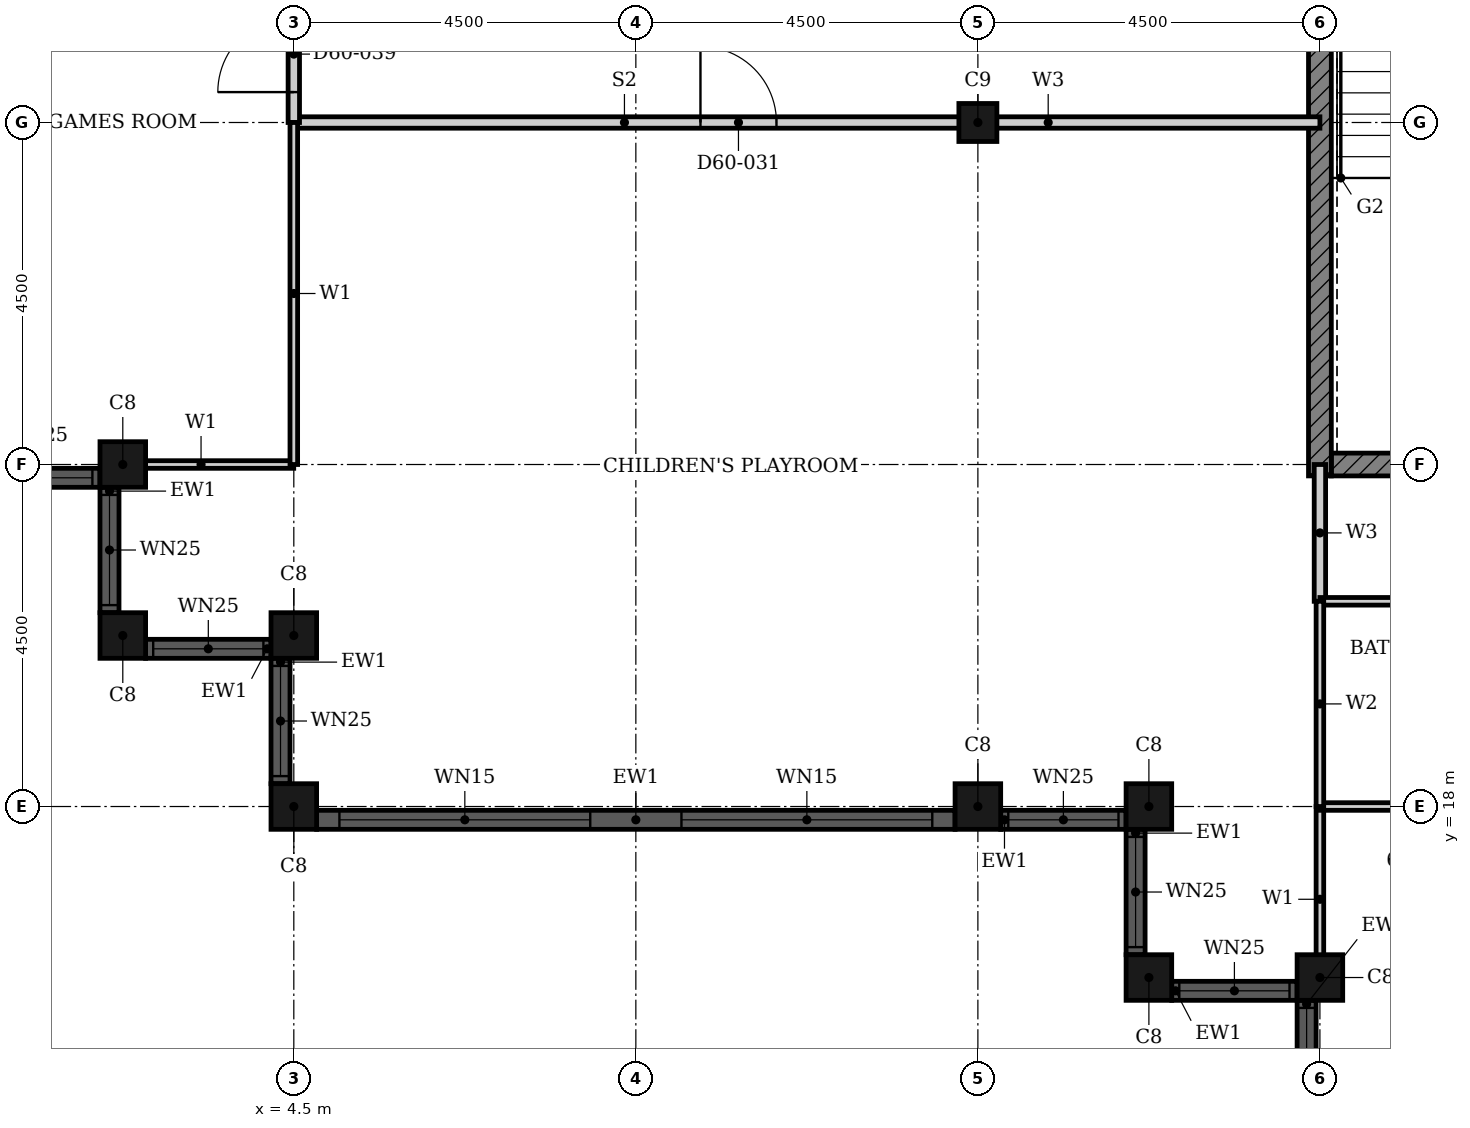
"""IFC4 building model, lengths in metres.
Left out: names, types, materials, properties, quantities, classifications, styles, units other than length and angle.
Written with IfcOpenShell. Run it as: python <this file> out.ifc"""

import sys

from ifc_helpers import new_model, si_unit, direction, frame, frame_2d, origin, origin_2d, place, context, subcontext, project, spatial, rectangle, hollow_rectangle, extrude, element, fill, save


model = new_model("IFC4")
c1 = context("Model", 3, precision=1e-05, world=origin(), true_north=direction((0.0, 1.0)))
c2 = subcontext(c1, "Body", "Model", "MODEL_VIEW")
j1 = project(units=[si_unit("LENGTHUNIT", "METRE"), si_unit("PLANEANGLEUNIT", "RADIAN")], contexts=[c1])
p1 = place(None, origin())
s1 = spatial("IfcSite", under=j1, at=p1, CompositionType="ELEMENT")
p2 = place(p1, origin())
s2 = spatial("IfcBuilding", under=s1, at=p2, CompositionType="ELEMENT")
p3 = place(p2, frame((0.0, 0.0, 237.9)))
s3 = spatial("IfcBuildingStorey", under=s2, at=p3, CompositionType="ELEMENT", Elevation=237.9)
for number, where, z_axis, x_axis in (
    (1, (15.75, 18.0, 0.0), (0.0, 0.0, 1.0), (1.0, 0.0, 0.0)),
    (2, (15.75, 15.75, 0.0), (0.0, 0.0, 1.0), (1.0, 0.0, 0.0)),
    (3, (18.0, 15.75, 0.0), (0.0, 0.0, 1.0), (1.0, 0.0, 0.0)),
    (4, (2.25, 22.5, 0.0), (0.0, 0.0, 1.0), (1.0, 0.0, 0.0)),
    (5, (2.25, 20.25, 0.0), (0.0, 0.0, 1.0), (1.0, 0.0, 0.0)),
    (6, (4.5, 20.25, 0.0), (0.0, 0.0, 1.0), (1.0, 0.0, 0.0)),
    (7, (4.5, 18.0, 0.0), (0.0, 0.0, 1.0), (1.0, 0.0, 0.0)),
    (8, (13.5, 18.0, 0.0), (0.0, 0.0, 1.0), (1.0, 0.0, 0.0)),
):
    element("IfcColumn", number, at=place(p3, frame(where, z_axis=z_axis, x_axis=x_axis)), inside=s3, PredefinedType="COLUMN", context=c2, shape_type="SweptSolid", body=[
        extrude(hollow_rectangle(XDim=0.6, YDim=0.6, WallThickness=0.02, at=origin_2d()), origin(), (0.0, 0.0, 1.0), 3.7),
    ])
p4 = place(p3, frame((13.5, 27.0, 0.0), z_axis=(0.0, 0.0, 1.0), x_axis=(1.0, 0.0, 0.0)))
e9 = element("IfcColumn", 9, at=p4, inside=s3, PredefinedType="COLUMN", context=c2, shape_type="SweptSolid", body=[
    extrude(hollow_rectangle(XDim=0.5, YDim=0.5, WallThickness=0.016, InnerFilletRadius=0.032, OuterFilletRadius=0.048, at=origin_2d()), origin(), (0.0, 0.0, 1.0), 3.7),
])
p5 = place(p3, frame((15.575, 17.7, 0.0), z_axis=(0.0, 0.0, 1.0), x_axis=(0.0, -1.0, 0.0)))
e10 = element("IfcWall", 10, at=p5, inside=s3, PredefinedType="SOLIDWALL", context=c2, shape_type="SweptSolid", body=[
    extrude(rectangle(XDim=1.65, YDim=0.25, at=frame_2d((0.825, 0.0))), origin(), (0.0, 0.0, 1.0), 3.7),
])
p6 = place(p5, frame((0.1, 0.0, 0.9)))
e11 = element("IfcOpeningElement", 11, at=p6, cuts=e10, PredefinedType="OPENING", context=c2, shape_type="SweptSolid", body=[
    extrude(rectangle(XDim=1.45, YDim=1.85, at=frame_2d((0.725, 0.925))), frame((0.0, 0.135, 0.0), z_axis=(0.0, -1.0, 0.0), x_axis=(1.0, 0.0, 0.0)), (0.0, 0.0, 1.0), 0.27),
])
p7 = place(p3, frame((16.05, 15.575, 0.0), z_axis=(0.0, 0.0, 1.0), x_axis=(1.0, 0.0, 0.0)))
e12 = element("IfcWall", 12, at=p7, inside=s3, PredefinedType="SOLIDWALL", context=c2, shape_type="SweptSolid", body=[
    extrude(rectangle(XDim=1.65, YDim=0.25, at=frame_2d((0.825, 0.0))), origin(), (0.0, 0.0, 1.0), 3.7),
])
p8 = place(p7, frame((0.1, 0.0, 0.9)))
e13 = element("IfcOpeningElement", 13, at=p8, cuts=e12, PredefinedType="OPENING", context=c2, shape_type="SweptSolid", body=[
    extrude(rectangle(XDim=1.45, YDim=1.85, at=frame_2d((0.725, 0.925))), frame((0.0, 0.135, 0.0), z_axis=(0.0, -1.0, 0.0), x_axis=(1.0, 0.0, 0.0)), (0.0, 0.0, 1.0), 0.27),
])
p9 = place(p3, frame((17.825, 15.45, 0.0), z_axis=(0.0, 0.0, 1.0), x_axis=(0.0, -1.0, 0.0)))
e14 = element("IfcWall", 14, at=p9, inside=s3, PredefinedType="SOLIDWALL", context=c2, shape_type="SweptSolid", body=[
    extrude(rectangle(XDim=1.65, YDim=0.25, at=frame_2d((0.825, 0.0))), origin(), (0.0, 0.0, 1.0), 3.7),
])
p10 = place(p9, frame((0.1, 0.0, 0.9)))
e15 = element("IfcOpeningElement", 15, at=p10, cuts=e14, PredefinedType="OPENING", context=c2, shape_type="SweptSolid", body=[
    extrude(rectangle(XDim=1.45, YDim=1.85, at=frame_2d((0.725, 0.925))), frame((0.0, 0.135, 0.0), z_axis=(0.0, -1.0, 0.0), x_axis=(1.0, 0.0, 0.0)), (0.0, 0.0, 1.0), 0.27),
])
p11 = place(p3, frame((0.3, 22.325, 0.0), z_axis=(0.0, 0.0, 1.0), x_axis=(1.0, 0.0, 0.0)))
e16 = element("IfcWall", 16, at=p11, inside=s3, PredefinedType="SOLIDWALL", context=c2, shape_type="SweptSolid", body=[
    extrude(rectangle(XDim=1.65, YDim=0.25, at=frame_2d((0.825, 0.0))), origin(), (0.0, 0.0, 1.0), 3.7),
])
p12 = place(p11, frame((0.1, 0.0, 0.9)))
e17 = element("IfcOpeningElement", 17, at=p12, cuts=e16, PredefinedType="OPENING", context=c2, shape_type="SweptSolid", body=[
    extrude(rectangle(XDim=1.45, YDim=1.85, at=frame_2d((0.725, 0.925))), frame((0.0, 0.135, 0.0), z_axis=(0.0, -1.0, 0.0), x_axis=(1.0, 0.0, 0.0)), (0.0, 0.0, 1.0), 0.27),
])
p13 = place(p3, frame((2.075, 22.2, 0.0), z_axis=(0.0, 0.0, 1.0), x_axis=(0.0, -1.0, 0.0)))
e18 = element("IfcWall", 18, at=p13, inside=s3, PredefinedType="SOLIDWALL", context=c2, shape_type="SweptSolid", body=[
    extrude(rectangle(XDim=1.65, YDim=0.25, at=frame_2d((0.825, 0.0))), origin(), (0.0, 0.0, 1.0), 3.7),
])
p14 = place(p13, frame((0.1, 0.0, 0.9)))
e19 = element("IfcOpeningElement", 19, at=p14, cuts=e18, PredefinedType="OPENING", context=c2, shape_type="SweptSolid", body=[
    extrude(rectangle(XDim=1.45, YDim=1.85, at=frame_2d((0.725, 0.925))), frame((0.0, 0.135, 0.0), z_axis=(0.0, -1.0, 0.0), x_axis=(1.0, 0.0, 0.0)), (0.0, 0.0, 1.0), 0.27),
])
p15 = place(p3, frame((2.55, 20.075, 0.0), z_axis=(0.0, 0.0, 1.0), x_axis=(1.0, 0.0, 0.0)))
e20 = element("IfcWall", 20, at=p15, inside=s3, PredefinedType="SOLIDWALL", context=c2, shape_type="SweptSolid", body=[
    extrude(rectangle(XDim=1.65, YDim=0.25, at=frame_2d((0.825, 0.0))), origin(), (0.0, 0.0, 1.0), 3.7),
])
p16 = place(p15, frame((0.1, 0.0, 0.9)))
e21 = element("IfcOpeningElement", 21, at=p16, cuts=e20, PredefinedType="OPENING", context=c2, shape_type="SweptSolid", body=[
    extrude(rectangle(XDim=1.45, YDim=1.85, at=frame_2d((0.725, 0.925))), frame((0.0, 0.135, 0.0), z_axis=(0.0, -1.0, 0.0), x_axis=(1.0, 0.0, 0.0)), (0.0, 0.0, 1.0), 0.27),
])
p17 = place(p3, frame((4.325, 19.95, 0.0), z_axis=(0.0, 0.0, 1.0), x_axis=(0.0, -1.0, 0.0)))
e22 = element("IfcWall", 22, at=p17, inside=s3, PredefinedType="SOLIDWALL", context=c2, shape_type="SweptSolid", body=[
    extrude(rectangle(XDim=1.65, YDim=0.25, at=frame_2d((0.825, 0.0))), origin(), (0.0, 0.0, 1.0), 3.7),
])
p18 = place(p17, frame((0.1, 0.0, 0.9)))
e23 = element("IfcOpeningElement", 23, at=p18, cuts=e22, PredefinedType="OPENING", context=c2, shape_type="SweptSolid", body=[
    extrude(rectangle(XDim=1.45, YDim=1.85, at=frame_2d((0.725, 0.925))), frame((0.0, 0.135, 0.0), z_axis=(0.0, -1.0, 0.0), x_axis=(1.0, 0.0, 0.0)), (0.0, 0.0, 1.0), 0.27),
])
p19 = place(p3, frame((4.8, 17.825, 0.0), z_axis=(0.0, 0.0, 1.0), x_axis=(1.0, 0.0, 0.0)))
e24 = element("IfcWall", 24, at=p19, inside=s3, PredefinedType="SOLIDWALL", context=c2, shape_type="SweptSolid", body=[
    extrude(rectangle(XDim=8.4, YDim=0.25, at=frame_2d((4.2, 0.0))), origin(), (0.0, 0.0, 1.0), 3.7),
])
p20 = place(p19, frame((0.3, 0.0, 0.45)))
e25 = element("IfcOpeningElement", 25, at=p20, cuts=e24, PredefinedType="OPENING", context=c2, shape_type="SweptSolid", body=[
    extrude(rectangle(XDim=3.3, YDim=2.3, at=frame_2d((1.65, 1.15))), frame((0.0, 0.135, 0.0), z_axis=(0.0, -1.0, 0.0), x_axis=(1.0, 0.0, 0.0)), (0.0, 0.0, 1.0), 0.27),
])
p21 = place(p19, frame((4.8, 0.0, 0.45)))
e26 = element("IfcOpeningElement", 26, at=p21, cuts=e24, PredefinedType="OPENING", context=c2, shape_type="SweptSolid", body=[
    extrude(rectangle(XDim=3.3, YDim=2.3, at=frame_2d((1.65, 1.15))), frame((0.0, 0.135, 0.0), z_axis=(0.0, -1.0, 0.0), x_axis=(1.0, 0.0, 0.0)), (0.0, 0.0, 1.0), 0.27),
])
p22 = place(p3, frame((13.8, 17.825, 0.0), z_axis=(0.0, 0.0, 1.0), x_axis=(1.0, 0.0, 0.0)))
e27 = element("IfcWall", 27, at=p22, inside=s3, PredefinedType="SOLIDWALL", context=c2, shape_type="SweptSolid", body=[
    extrude(rectangle(XDim=1.65, YDim=0.25, at=frame_2d((0.825, 0.0))), origin(), (0.0, 0.0, 1.0), 3.7),
])
p23 = place(p22, frame((0.1, 0.0, 0.9)))
e28 = element("IfcOpeningElement", 28, at=p23, cuts=e27, PredefinedType="OPENING", context=c2, shape_type="SweptSolid", body=[
    extrude(rectangle(XDim=1.45, YDim=1.85, at=frame_2d((0.725, 0.925))), frame((0.0, 0.135, 0.0), z_axis=(0.0, -1.0, 0.0), x_axis=(1.0, 0.0, 0.0)), (0.0, 0.0, 1.0), 0.27),
])
p24 = place(p3, frame((18.15, 22.5, 0.0), z_axis=(0.0, 0.0, 1.0), x_axis=(1.0, 0.0, 0.0)))
e29 = element("IfcWall", 29, at=p24, inside=s3, PredefinedType="SHEAR", context=c2, shape_type="SweptSolid", body=[
    extrude(rectangle(XDim=4.225, YDim=0.3, at=frame_2d((2.113, 0.0))), origin(), (0.0, 0.0, 1.0), 3.4),
])
p25 = place(p3, frame((18.0, 22.35, 0.0), z_axis=(0.0, 0.0, 1.0), x_axis=(0.0, 1.0, 0.0)))
e30 = element("IfcWall", 30, at=p25, inside=s3, PredefinedType="SHEAR", context=c2, shape_type="SweptSolid", body=[
    extrude(rectangle(XDim=9.3, YDim=0.3, at=frame_2d((4.65, 0.0))), origin(), (0.0, 0.0, 1.0), 3.4),
])
p26 = place(p3, frame((4.5, 27.0, 0.0), z_axis=(0.0, 0.0, 1.0), x_axis=(1.0, 0.0, 0.0)))
e31 = element("IfcWall", 31, at=p26, inside=s3, PredefinedType="PARTITIONING", context=c2, shape_type="SweptSolid", body=[
    extrude(rectangle(XDim=13.5, YDim=0.15, at=frame_2d((6.75, 0.0))), origin(), (0.0, 0.0, 1.0), 2.68),
])
p27 = place(p26, frame((5.35, 0.0, 0.0)))
e32 = element("IfcOpeningElement", 32, at=p27, cuts=e31, PredefinedType="OPENING", context=c2, shape_type="SweptSolid", body=[
    extrude(rectangle(XDim=1.0, YDim=2.1, at=frame_2d((0.5, 1.05))), frame((0.0, 0.085, 0.0), z_axis=(0.0, -1.0, 0.0), x_axis=(1.0, 0.0, 0.0)), (0.0, 0.0, 1.0), 0.17),
])
p28 = place(p3, frame((18.0, 20.7, 0.0), z_axis=(0.0, 0.0, 1.0), x_axis=(0.0, 1.0, 0.0)))
e33 = element("IfcWall", 33, at=p28, inside=s3, PredefinedType="PARTITIONING", context=c2, shape_type="SweptSolid", body=[
    extrude(rectangle(XDim=1.8, YDim=0.15, at=frame_2d((0.9, 0.0))), origin(), (0.0, 0.0, 1.0), 3.4),
])
p29 = place(p3, frame((4.5, 27.0, 0.0), z_axis=(0.0, 0.0, 1.0), x_axis=(0.0, 1.0, 0.0)))
e34 = element("IfcWall", 34, at=p29, inside=s3, PredefinedType="PARTITIONING", context=c2, shape_type="SweptSolid", body=[
    extrude(rectangle(XDim=1.8, YDim=0.15, at=frame_2d((0.9, 0.0))), origin(), (0.0, 0.0, 1.0), 3.4),
])
p30 = place(p29, frame((0.4, 0.0, 0.0)))
e35 = element("IfcOpeningElement", 35, at=p30, cuts=e34, PredefinedType="OPENING", context=c2, shape_type="SweptSolid", body=[
    extrude(rectangle(XDim=1.0, YDim=2.1, at=frame_2d((0.5, 1.05))), frame((0.0, 0.085, 0.0), z_axis=(0.0, -1.0, 0.0), x_axis=(1.0, 0.0, 0.0)), (0.0, 0.0, 1.0), 0.17),
])
p31 = place(p3, frame((2.06, 22.5, 0.0), z_axis=(0.0, 0.0, 1.0), x_axis=(1.0, 0.0, 0.0)))
e36 = element("IfcWall", 36, at=p31, inside=s3, PredefinedType="PARTITIONING", context=c2, shape_type="SweptSolid", body=[
    extrude(rectangle(XDim=2.439, YDim=0.1, at=frame_2d((1.219, 0.0))), origin(), (0.0, 0.0, 1.0), 2.68),
])
p32 = place(p3, frame((18.0, 15.56, 0.0), z_axis=(0.0, 0.0, 1.0), x_axis=(0.0, 1.0, 0.0)))
e37 = element("IfcWall", 37, at=p32, inside=s3, PredefinedType="PARTITIONING", context=c2, shape_type="SweptSolid", body=[
    extrude(rectangle(XDim=2.439, YDim=0.1, at=frame_2d((1.219, 0.0))), origin(), (0.0, 0.0, 1.0), 3.4),
])
p33 = place(p3, frame((4.5, 22.5, 0.0), z_axis=(0.0, 0.0, 1.0), x_axis=(0.0, 1.0, 0.0)))
e38 = element("IfcWall", 38, at=p33, inside=s3, PredefinedType="PARTITIONING", context=c2, shape_type="SweptSolid", body=[
    extrude(rectangle(XDim=4.5, YDim=0.1, at=frame_2d((2.25, 0.0))), origin(), (0.0, 0.0, 1.0), 3.4),
])
for number, where, z_axis, x_axis in (
    (39, (18.0, 18.0, 0.0), (0.0, 0.0, 1.0), (1.0, 0.0, 0.0)),
    (40, (18.0, 20.7, 0.0), (0.0, 0.0, 1.0), (1.0, 0.0, 0.0)),
):
    element("IfcWall", number, at=place(p3, frame(where, z_axis=z_axis, x_axis=x_axis)), inside=s3, PredefinedType="PARTITIONING", context=c2, shape_type="SweptSolid", body=[
        extrude(rectangle(XDim=2.4, YDim=0.1, at=frame_2d((1.2, 0.0))), origin(), (0.0, 0.0, 1.0), 3.4),
    ])
p34 = place(p3, frame((18.0, 18.0, 0.0), z_axis=(0.0, 0.0, 1.0), x_axis=(0.0, 1.0, 0.0)))
e41 = element("IfcWall", 41, at=p34, inside=s3, PredefinedType="PARTITIONING", context=c2, shape_type="SweptSolid", body=[
    extrude(rectangle(XDim=2.7, YDim=0.1, at=frame_2d((1.35, 0.0))), origin(), (0.0, 0.0, 1.0), 3.4),
])
p35 = place(p6, origin())
e42 = element("IfcWindow", 42, at=p35, inside=s3, PartitioningType="SINGLE_PANEL", PredefinedType="WINDOW", context=c2, shape_type="SweptSolid", body=[
    extrude(rectangle(XDim=1.45, YDim=1.85, at=frame_2d((0.725, 0.925))), frame((0.0, 0.03, 0.0), z_axis=(0.0, -1.0, 0.0), x_axis=(1.0, 0.0, 0.0)), (0.0, 0.0, 1.0), 0.06),
])
fill(e11, e42)
p36 = place(p8, origin())
e43 = element("IfcWindow", 43, at=p36, inside=s3, PartitioningType="SINGLE_PANEL", PredefinedType="WINDOW", context=c2, shape_type="SweptSolid", body=[
    extrude(rectangle(XDim=1.45, YDim=1.85, at=frame_2d((0.725, 0.925))), frame((0.0, 0.03, 0.0), z_axis=(0.0, -1.0, 0.0), x_axis=(1.0, 0.0, 0.0)), (0.0, 0.0, 1.0), 0.06),
])
fill(e13, e43)
p37 = place(p10, origin())
e44 = element("IfcWindow", 44, at=p37, inside=s3, PartitioningType="SINGLE_PANEL", PredefinedType="WINDOW", context=c2, shape_type="SweptSolid", body=[
    extrude(rectangle(XDim=1.45, YDim=1.85, at=frame_2d((0.725, 0.925))), frame((0.0, 0.03, 0.0), z_axis=(0.0, -1.0, 0.0), x_axis=(1.0, 0.0, 0.0)), (0.0, 0.0, 1.0), 0.06),
])
fill(e15, e44)
p38 = place(p12, origin())
e45 = element("IfcWindow", 45, at=p38, inside=s3, PartitioningType="SINGLE_PANEL", PredefinedType="WINDOW", context=c2, shape_type="SweptSolid", body=[
    extrude(rectangle(XDim=1.45, YDim=1.85, at=frame_2d((0.725, 0.925))), frame((0.0, 0.03, 0.0), z_axis=(0.0, -1.0, 0.0), x_axis=(1.0, 0.0, 0.0)), (0.0, 0.0, 1.0), 0.06),
])
fill(e17, e45)
p39 = place(p14, origin())
e46 = element("IfcWindow", 46, at=p39, inside=s3, PartitioningType="SINGLE_PANEL", PredefinedType="WINDOW", context=c2, shape_type="SweptSolid", body=[
    extrude(rectangle(XDim=1.45, YDim=1.85, at=frame_2d((0.725, 0.925))), frame((0.0, 0.03, 0.0), z_axis=(0.0, -1.0, 0.0), x_axis=(1.0, 0.0, 0.0)), (0.0, 0.0, 1.0), 0.06),
])
fill(e19, e46)
p40 = place(p16, origin())
e47 = element("IfcWindow", 47, at=p40, inside=s3, PartitioningType="SINGLE_PANEL", PredefinedType="WINDOW", context=c2, shape_type="SweptSolid", body=[
    extrude(rectangle(XDim=1.45, YDim=1.85, at=frame_2d((0.725, 0.925))), frame((0.0, 0.03, 0.0), z_axis=(0.0, -1.0, 0.0), x_axis=(1.0, 0.0, 0.0)), (0.0, 0.0, 1.0), 0.06),
])
fill(e21, e47)
p41 = place(p18, origin())
e48 = element("IfcWindow", 48, at=p41, inside=s3, PartitioningType="SINGLE_PANEL", PredefinedType="WINDOW", context=c2, shape_type="SweptSolid", body=[
    extrude(rectangle(XDim=1.45, YDim=1.85, at=frame_2d((0.725, 0.925))), frame((0.0, 0.03, 0.0), z_axis=(0.0, -1.0, 0.0), x_axis=(1.0, 0.0, 0.0)), (0.0, 0.0, 1.0), 0.06),
])
fill(e23, e48)
p42 = place(p20, origin())
e49 = element("IfcWindow", 49, at=p42, inside=s3, PartitioningType="SINGLE_PANEL", PredefinedType="WINDOW", context=c2, shape_type="SweptSolid", body=[
    extrude(rectangle(XDim=3.3, YDim=2.3, at=frame_2d((1.65, 1.15))), frame((0.0, 0.03, 0.0), z_axis=(0.0, -1.0, 0.0), x_axis=(1.0, 0.0, 0.0)), (0.0, 0.0, 1.0), 0.06),
])
fill(e25, e49)
p43 = place(p21, origin())
e50 = element("IfcWindow", 50, at=p43, inside=s3, PartitioningType="SINGLE_PANEL", PredefinedType="WINDOW", context=c2, shape_type="SweptSolid", body=[
    extrude(rectangle(XDim=3.3, YDim=2.3, at=frame_2d((1.65, 1.15))), frame((0.0, 0.03, 0.0), z_axis=(0.0, -1.0, 0.0), x_axis=(1.0, 0.0, 0.0)), (0.0, 0.0, 1.0), 0.06),
])
fill(e26, e50)
p44 = place(p23, origin())
e51 = element("IfcWindow", 51, at=p44, inside=s3, PartitioningType="SINGLE_PANEL", PredefinedType="WINDOW", context=c2, shape_type="SweptSolid", body=[
    extrude(rectangle(XDim=1.45, YDim=1.85, at=frame_2d((0.725, 0.925))), frame((0.0, 0.03, 0.0), z_axis=(0.0, -1.0, 0.0), x_axis=(1.0, 0.0, 0.0)), (0.0, 0.0, 1.0), 0.06),
])
fill(e28, e51)
p45 = place(p27, origin())
e52 = element("IfcDoor", 52, at=p45, inside=s3, OperationType="SINGLE_SWING_LEFT", PredefinedType="DOOR", context=c2, shape_type="SweptSolid", body=[
    extrude(rectangle(XDim=1.0, YDim=2.1, at=frame_2d((0.5, 1.05))), frame((0.0, 0.025, 0.0), z_axis=(0.0, -1.0, 0.0), x_axis=(1.0, 0.0, 0.0)), (0.0, 0.0, 1.0), 0.05),
])
fill(e32, e52)
p46 = place(p30, origin())
e53 = element("IfcDoor", 53, at=p46, inside=s3, OperationType="SINGLE_SWING_RIGHT", PredefinedType="DOOR", context=c2, shape_type="SweptSolid", body=[
    extrude(rectangle(XDim=1.0, YDim=2.1, at=frame_2d((0.5, 1.05))), frame((0.0, 0.025, 0.0), z_axis=(0.0, -1.0, 0.0), x_axis=(1.0, 0.0, 0.0)), (0.0, 0.0, 1.0), 0.05),
])
fill(e35, e53)
save(model, sys.argv[1])
